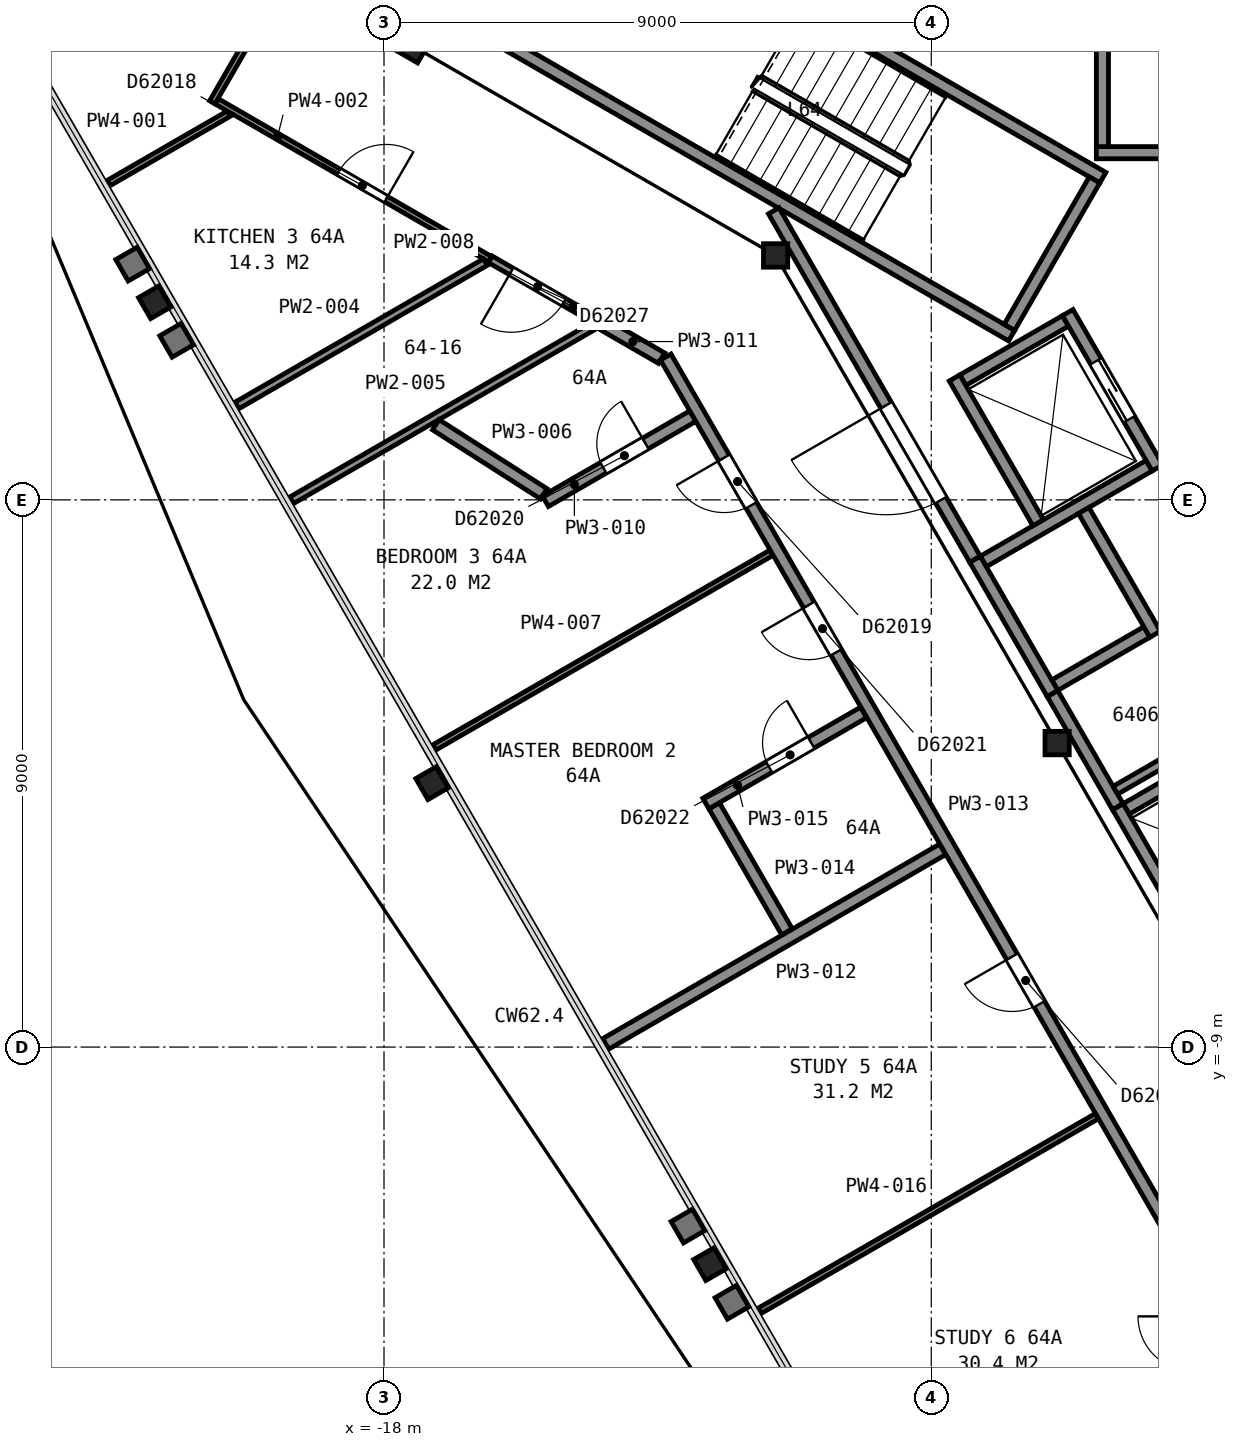
"""IFC4 building model, lengths in metres.
Left out: names, types, materials, properties, quantities, classifications, styles, units other than length and angle.
Written with IfcOpenShell. Run it as: python <this file> out.ifc"""

import sys

from ifc_helpers import new_model, si_unit, direction, frame, frame_2d, origin, origin_2d, place, context, subcontext, project, spatial, rectangle, i_section, extrude, element, fill, save


model = new_model("IFC4")
c1 = context("Model", 3, precision=1e-05, world=origin(), true_north=direction((0.0, 1.0)))
c2 = subcontext(c1, "Body", "Model", "MODEL_VIEW")
j1 = project(units=[si_unit("LENGTHUNIT", "METRE"), si_unit("PLANEANGLEUNIT", "RADIAN")], contexts=[c1])
p1 = place(None, origin())
s1 = spatial("IfcSite", under=j1, at=p1, CompositionType="ELEMENT")
p2 = place(p1, origin())
s2 = spatial("IfcBuilding", under=s1, at=p2, CompositionType="ELEMENT")
p3 = place(p2, frame((0.0, 0.0, 254.5)))
s3 = spatial("IfcBuildingStorey", under=s2, at=p3, CompositionType="ELEMENT", Elevation=254.5)
for number, where, z_axis, x_axis in (
    (1, (-21.77, 3.25, 0.0), (0.0, 0.0, 1.0), (-0.5, 0.866, 0.0)),
    (2, (-17.21, -4.66, 0.0), (0.0, 0.0, 1.0), (-0.5, 0.866, 0.0)),
    (3, (-12.64, -12.57, 0.0), (0.0, 0.0, 1.0), (-0.5, 0.866, 0.0)),
):
    element("IfcColumn", number, at=place(p3, frame(where, z_axis=z_axis, x_axis=x_axis)), inside=s3, PredefinedType="COLUMN", context=c2, shape_type="SweptSolid", body=[
        extrude(i_section(OverallWidth=0.399, OverallDepth=0.386, WebThickness=0.021, FlangeThickness=0.033, FilletRadius=0.015, at=origin_2d()), origin(), (0.0, 0.0, 1.0), 3.01),
    ])
p4 = place(p3, frame((-17.52, 7.46, 0.0), z_axis=(0.0, 0.0, 1.0), x_axis=(0.5, 0.866025403784, 0.0)))
e4 = element("IfcColumn", 4, at=p4, inside=s3, PredefinedType="COLUMN", context=c2, shape_type="SweptSolid", body=[
    extrude(i_section(OverallWidth=0.401, OverallDepth=0.399, WebThickness=0.025, FlangeThickness=0.04, FilletRadius=0.015, at=origin_2d()), origin(), (0.0, 0.0, 1.0), 3.65),
])
p5 = place(p3, frame((-11.56, 4.02, 0.0), z_axis=(0.0, 0.0, 1.0), x_axis=(1.0, 0.0, 0.0)))
e5 = element("IfcColumn", 5, at=p5, inside=s3, PredefinedType="COLUMN", context=c2, shape_type="SweptSolid", body=[
    extrude(i_section(OverallWidth=0.399, OverallDepth=0.386, WebThickness=0.021, FlangeThickness=0.033, FilletRadius=0.015, at=origin_2d()), origin(), (0.0, 0.0, 1.0), 3.635),
])
p6 = place(p3, frame((-6.93, -4.0, 0.0), z_axis=(0.0, 0.0, 1.0), x_axis=(1.0, 0.0, 0.0)))
e6 = element("IfcColumn", 6, at=p6, inside=s3, PredefinedType="COLUMN", context=c2, shape_type="SweptSolid", body=[
    extrude(i_section(OverallWidth=0.399, OverallDepth=0.386, WebThickness=0.021, FlangeThickness=0.033, FilletRadius=0.015, at=origin_2d()), origin(), (0.0, 0.0, 1.0), 3.66),
])
for number, where, z_axis, x_axis in (
    (7, (-7.678, 2.701, 0.0), (0.0, 0.0, 1.0), (-0.866, 0.5, 0.0)),
    (8, (-6.178, 5.299, 0.0), (0.0, 0.0, 1.0), (-0.866, 0.5, 0.0)),
):
    element("IfcWall", number, at=place(p3, frame(where, z_axis=z_axis, x_axis=x_axis)), inside=s3, PredefinedType="PARTITIONING", context=c2, shape_type="SweptSolid", body=[
        extrude(rectangle(XDim=9.6, YDim=0.2, at=frame_2d((4.8, 0.0))), origin(), (0.0, 0.0, 1.0), 3.45),
    ])
p7 = place(p3, frame((-6.315, 5.262, 0.0), z_axis=(0.0, 0.0, 1.0), x_axis=(-0.500049511043, -0.865996816683, 0.0)))
e9 = element("IfcWall", 9, at=p7, inside=s3, PredefinedType="PARTITIONING", context=c2, shape_type="SweptSolid", body=[
    extrude(rectangle(XDim=2.8, YDim=0.2, at=frame_2d((1.4, 0.0))), origin(), (0.0, 0.0, 1.0), 3.45),
])
p8 = place(p3, frame((-6.285, 5.71, 0.0), z_axis=(0.0, 0.0, 1.0), x_axis=(1.0, 0.0, 0.0)))
e10 = element("IfcWall", 10, at=p8, inside=s3, PredefinedType="PARTITIONING", context=c2, shape_type="SweptSolid", body=[
    extrude(rectangle(XDim=2.35, YDim=0.2, at=frame_2d((1.175, 0.0))), origin(), (0.0, 0.0, 1.0), 3.7),
])
for number, where, z_axis, x_axis in (
    (11, (-5.795, -5.083, 0.0), (0.0, 0.0, 1.0), (0.866, 0.5, 0.0)),
    (12, (-6.97, -3.048, 0.0), (0.0, 0.0, 1.0), (0.866, 0.5, 0.0)),
):
    element("IfcWall", number, at=place(p3, frame(where, z_axis=z_axis, x_axis=x_axis)), inside=s3, PredefinedType="PARTITIONING", context=c2, shape_type="SweptSolid", body=[
        extrude(rectangle(XDim=1.75, YDim=0.2, at=frame_2d((0.875, 0.0))), origin(), (0.0, 0.0, 1.0), 3.7),
    ])
p9 = place(p3, frame((-8.145, -1.013, 0.0), z_axis=(0.0, 0.0, 1.0), x_axis=(0.866016494683, 0.500015430699, 0.0)))
e13 = element("IfcWall", 13, at=p9, inside=s3, PredefinedType="PARTITIONING", context=c2, shape_type="SweptSolid", body=[
    extrude(rectangle(XDim=3.15, YDim=0.2, at=frame_2d((1.575, 0.0))), origin(), (0.0, 0.0, 1.0), 3.7),
])
p10 = place(p3, frame((-8.48, 1.969, 0.0), z_axis=(0.0, 0.0, 1.0), x_axis=(0.866000020948, 0.500043961785, 0.0)))
e14 = element("IfcWall", 14, at=p10, inside=s3, PredefinedType="PARTITIONING", context=c2, shape_type="SweptSolid", body=[
    extrude(rectangle(XDim=1.95, YDim=0.2, at=frame_2d((0.975, 0.0))), origin(), (0.0, 0.0, 1.0), 3.7),
])
p11 = place(p3, frame((-6.185, 5.81, 0.0), z_axis=(0.0, 0.0, 1.0), x_axis=(0.0, 1.0, 0.0)))
e15 = element("IfcWall", 15, at=p11, inside=s3, PredefinedType="PARTITIONING", context=c2, shape_type="SweptSolid", body=[
    extrude(rectangle(XDim=1.75, YDim=0.2, at=frame_2d((0.875, 0.0))), origin(), (0.0, 0.0, 1.0), 3.7),
])
p12 = place(p3, frame((-5.28, 0.525, 0.0), z_axis=(0.0, 0.0, 1.0), x_axis=(-0.500037662692, 0.866003658127, 0.0)))
e16 = element("IfcWall", 16, at=p12, inside=s3, PredefinedType="PARTITIONING", context=c2, shape_type="SweptSolid", body=[
    extrude(rectangle(XDim=2.95, YDim=0.2, at=frame_2d((1.475, 0.0))), origin(), (0.0, 0.0, 1.0), 3.7),
])
p13 = place(p12, frame((0.925, 0.0, 0.0)))
e17 = element("IfcOpeningElement", 17, at=p13, cuts=e16, PredefinedType="OPENING", context=c2, shape_type="SweptSolid", body=[
    extrude(rectangle(XDim=1.1, YDim=2.1, at=frame_2d((0.55, 1.05))), frame((0.0, 0.11, 0.0), z_axis=(0.0, -1.0, 0.0), x_axis=(1.0, 0.0, 0.0)), (0.0, 0.0, 1.0), 0.22),
])
p14 = place(p3, frame((-5.318, -2.21, 0.0), z_axis=(0.0, 0.0, 1.0), x_axis=(-0.499938297808, 0.866061024631, 0.0)))
e18 = element("IfcWall", 18, at=p14, inside=s3, PredefinedType="PARTITIONING", context=c2, shape_type="SweptSolid", body=[
    extrude(rectangle(XDim=2.35, YDim=0.2, at=frame_2d((1.175, 0.0))), origin(), (0.0, 0.0, 1.0), 3.7),
])
p15 = place(p3, frame((-7.242, -0.376, 0.0), z_axis=(0.0, 0.0, 1.0), x_axis=(-0.499996545922, 0.866027397988, 0.0)))
e19 = element("IfcWall", 19, at=p15, inside=s3, PredefinedType="PARTITIONING", context=c2, shape_type="SweptSolid", body=[
    extrude(rectangle(XDim=2.75, YDim=0.2, at=frame_2d((1.375, 0.0))), origin(), (0.0, 0.0, 1.0), 3.7),
])
for number, where, z_axis, x_axis in (
    (20, (-4.656, -7.255, 0.0), (0.0, 0.0, 1.0), (-0.5, 0.866, 0.0)),
    (21, (-7.006, -3.185, 0.0), (0.0, 0.0, 1.0), (-0.5, 0.866, 0.0)),
):
    element("IfcWall", number, at=place(p3, frame(where, z_axis=z_axis, x_axis=x_axis)), inside=s3, PredefinedType="PARTITIONING", context=c2, shape_type="SweptSolid", body=[
        extrude(rectangle(XDim=2.55, YDim=0.2, at=frame_2d((1.275, 0.0))), origin(), (0.0, 0.0, 1.0), 3.7),
    ])
p16 = place(p3, frame((-11.591, 4.755, 0.0), z_axis=(0.0, 0.0, 1.0), x_axis=(0.500043977787, -0.866000011708, 0.0)))
e22 = element("IfcWall", 22, at=p16, inside=s3, PredefinedType="PARTITIONING", context=c2, shape_type="SweptSolid", body=[
    extrude(rectangle(XDim=6.617, YDim=0.2, at=frame_2d((3.308, 0.0))), origin(), (0.0, 0.0, 1.0), 3.45),
])
p17 = place(p16, frame((3.695, 0.0, 0.0)))
e23 = element("IfcOpeningElement", 23, at=p17, cuts=e22, PredefinedType="OPENING", context=c2, shape_type="SweptSolid", body=[
    extrude(rectangle(XDim=1.8, YDim=2.1, at=frame_2d((0.9, 1.05))), frame((0.0, 0.11, 0.0), z_axis=(0.0, -1.0, 0.0), x_axis=(1.0, 0.0, 0.0)), (0.0, 0.0, 1.0), 0.22),
])
p18 = place(p3, frame((-7.005, -3.187, 0.0), z_axis=(0.0, 0.0, 1.0), x_axis=(0.499689606989, -0.866204535123, 0.0)))
e24 = element("IfcWall", 24, at=p18, inside=s3, PredefinedType="PARTITIONING", context=c2, shape_type="SweptSolid", body=[
    extrude(rectangle(XDim=2.145, YDim=0.2, at=frame_2d((1.072, 0.0))), origin(), (0.0, 0.0, 1.0), 3.45),
])
p19 = place(p3, frame((-5.972, -4.776, 0.0), z_axis=(0.0, 0.0, 1.0), x_axis=(0.8660731567, 0.4999172804, 0.0)))
e25 = element("IfcWall", 25, at=p19, inside=s3, PredefinedType="PARTITIONING", context=c2, shape_type="SweptSolid", body=[
    extrude(rectangle(XDim=2.676, YDim=0.15, at=frame_2d((1.338, 0.0))), origin(), (0.0, 0.0, 1.0), 3.45),
])
p20 = place(p3, frame((-22.53, 5.21, 0.0), z_axis=(0.0, 0.0, 1.0), x_axis=(0.865865073245, 0.500277597875, 0.0)))
e26 = element("IfcWall", 26, at=p20, inside=s3, PredefinedType="PARTITIONING", context=c2, shape_type="SweptSolid", body=[
    extrude(rectangle(XDim=2.284, YDim=0.1, at=frame_2d((1.142, 0.0))), origin(), (0.0, 0.0, 1.0), 2.362),
])
p21 = place(p3, frame((-16.253, 3.957, 0.0), z_axis=(0.0, 0.0, 1.0), x_axis=(-0.866006514596, 0.500032715607, 0.0)))
e27 = element("IfcWall", 27, at=p21, inside=s3, PredefinedType="PARTITIONING", context=c2, shape_type="SweptSolid", body=[
    extrude(rectangle(XDim=5.199, YDim=0.1, at=frame_2d((2.6, 0.0))), origin(), (0.0, 0.0, 1.0), 2.362),
])
p22 = place(p21, frame((1.978, 0.0, 0.0)))
e28 = element("IfcOpeningElement", 28, at=p22, cuts=e27, PredefinedType="OPENING", context=c2, shape_type="SweptSolid", body=[
    extrude(rectangle(XDim=0.9, YDim=2.1, at=frame_2d((0.45, 1.05))), frame((0.0, 0.06, 0.0), z_axis=(0.0, -1.0, 0.0), x_axis=(1.0, 0.0, 0.0)), (0.0, 0.0, 1.0), 0.12),
])
p23 = place(p3, frame((-20.824, 6.539, 0.0), z_axis=(0.0, 0.0, 1.0), x_axis=(0.500297300687, 0.865853689098, 0.0)))
e29 = element("IfcWall", 29, at=p23, inside=s3, PredefinedType="PARTITIONING", context=c2, shape_type="SweptSolid", body=[
    extrude(rectangle(XDim=9.496, YDim=0.1, at=frame_2d((4.748, 0.0))), origin(), (0.0, 0.0, 1.0), 2.362),
])
p24 = place(p23, frame((4.3, 0.0, 0.0)))
e30 = element("IfcOpeningElement", 30, at=p24, cuts=e29, PredefinedType="OPENING", context=c2, shape_type="SweptSolid", body=[
    extrude(rectangle(XDim=0.9, YDim=2.1, at=frame_2d((0.45, 1.05))), frame((0.0, 0.06, 0.0), z_axis=(0.0, -1.0, 0.0), x_axis=(1.0, 0.0, 0.0)), (0.0, 0.0, 1.0), 0.12),
])
p25 = place(p3, frame((-20.418, 1.553, 0.0), z_axis=(0.0, 0.0, 1.0), x_axis=(0.8660976733, 0.49987480463, 0.0)))
e31 = element("IfcWall", 31, at=p25, inside=s3, PredefinedType="PARTITIONING", context=c2, shape_type="SweptSolid", body=[
    extrude(rectangle(XDim=4.717, YDim=0.125, at=frame_2d((2.358, 0.0))), origin(), (0.0, 0.0, 1.0), 2.362),
])
p26 = place(p3, frame((-19.518, -0.006, 0.0), z_axis=(0.0, 0.0, 1.0), x_axis=(0.866072118736, 0.499919078599, 0.0)))
e32 = element("IfcWall", 32, at=p26, inside=s3, PredefinedType="PARTITIONING", context=c2, shape_type="SweptSolid", body=[
    extrude(rectangle(XDim=5.912, YDim=0.125, at=frame_2d((2.956, 0.0))), origin(), (0.0, 0.0, 1.0), 2.362),
])
p27 = place(p3, frame((-17.149, 1.236, 0.0), z_axis=(0.0, 0.0, 1.0), x_axis=(0.842376529327, -0.538889397593, 0.0)))
e33 = element("IfcWall", 33, at=p27, inside=s3, PredefinedType="PARTITIONING", context=c2, shape_type="SweptSolid", body=[
    extrude(rectangle(XDim=2.108, YDim=0.2, at=frame_2d((1.054, 0.0))), origin(), (0.0, 0.0, 1.0), 2.362),
])
p28 = place(p3, frame((-17.171, -4.071, 0.0), z_axis=(0.0, 0.0, 1.0), x_axis=(0.865973383125, 0.500090091603, 0.0)))
e34 = element("IfcWall", 34, at=p28, inside=s3, PredefinedType="PARTITIONING", context=c2, shape_type="SweptSolid", body=[
    extrude(rectangle(XDim=6.4, YDim=0.1, at=frame_2d((3.2, 0.0))), origin(), (0.0, 0.0, 1.0), 2.362),
])
p29 = place(p3, frame((-16.253, 3.957, 0.0), z_axis=(0.0, 0.0, 1.0), x_axis=(0.866173232673, -0.499743865396, 0.0)))
e35 = element("IfcWall", 35, at=p29, inside=s3, PredefinedType="PARTITIONING", context=c2, shape_type="SweptSolid", body=[
    extrude(rectangle(XDim=1.974, YDim=0.125, at=frame_2d((0.987, 0.0))), origin(), (0.0, 0.0, 1.0), 2.362),
])
p30 = place(p29, frame((0.4, 0.0, 0.0)))
e36 = element("IfcOpeningElement", 36, at=p30, cuts=e35, PredefinedType="OPENING", context=c2, shape_type="SweptSolid", body=[
    extrude(rectangle(XDim=1.0, YDim=2.1, at=frame_2d((0.5, 1.05))), frame((0.0, 0.073, 0.0), z_axis=(0.0, -1.0, 0.0), x_axis=(1.0, 0.0, 0.0)), (0.0, 0.0, 1.0), 0.145),
])
p31 = place(p3, frame((-15.346, -0.023, 0.0), z_axis=(0.0, 0.0, 1.0), x_axis=(0.865969158485, 0.500097407065, 0.0)))
e37 = element("IfcWall", 37, at=p31, inside=s3, PredefinedType="PARTITIONING", context=c2, shape_type="SweptSolid", body=[
    extrude(rectangle(XDim=2.799, YDim=0.2, at=frame_2d((1.4, 0.0))), origin(), (0.0, 0.0, 1.0), 2.362),
])
p32 = place(p31, frame((1.1, 0.0, 0.0)))
e38 = element("IfcOpeningElement", 38, at=p32, cuts=e37, PredefinedType="OPENING", context=c2, shape_type="SweptSolid", body=[
    extrude(rectangle(XDim=0.8, YDim=2.1, at=frame_2d((0.4, 1.05))), frame((0.0, 0.11, 0.0), z_axis=(0.0, -1.0, 0.0), x_axis=(1.0, 0.0, 0.0)), (0.0, 0.0, 1.0), 0.22),
])
p33 = place(p3, frame((-14.381, 2.877, 0.0), z_axis=(0.0, 0.0, 1.0), x_axis=(0.866215333661, -0.499670887416, 0.0)))
e39 = element("IfcWall", 39, at=p33, inside=s3, PredefinedType="PARTITIONING", context=c2, shape_type="SweptSolid", body=[
    extrude(rectangle(XDim=1.093, YDim=0.2, at=frame_2d((0.546, 0.0))), origin(), (0.0, 0.0, 1.0), 2.362),
])
p34 = place(p3, frame((-14.355, -8.948, 0.0), z_axis=(0.0, 0.0, 1.0), x_axis=(0.866039463868, 0.499975646431, 0.0)))
e40 = element("IfcWall", 40, at=p34, inside=s3, PredefinedType="PARTITIONING", context=c2, shape_type="SweptSolid", body=[
    extrude(rectangle(XDim=6.399, YDim=0.2, at=frame_2d((3.2, 0.0))), origin(), (0.0, 0.0, 1.0), 2.362),
])
p35 = place(p3, frame((-4.675, -12.706, 0.0), z_axis=(0.0, 0.0, 1.0), x_axis=(-0.499972470324, 0.866041297467, 0.0)))
e41 = element("IfcWall", 41, at=p35, inside=s3, PredefinedType="PARTITIONING", context=c2, shape_type="SweptSolid", body=[
    extrude(rectangle(XDim=17.385, YDim=0.2, at=frame_2d((8.692, 0.0))), origin(), (0.0, 0.0, 1.0), 2.362),
])
p36 = place(p35, frame((14.57, 0.0, 0.0)))
e42 = element("IfcOpeningElement", 42, at=p36, cuts=e41, PredefinedType="OPENING", context=c2, shape_type="SweptSolid", body=[
    extrude(rectangle(XDim=0.9, YDim=2.1, at=frame_2d((0.45, 1.05))), frame((0.0, 0.11, 0.0), z_axis=(0.0, -1.0, 0.0), x_axis=(1.0, 0.0, 0.0)), (0.0, 0.0, 1.0), 0.22),
])
p37 = place(p35, frame((11.777, 0.0, 0.0)))
e43 = element("IfcOpeningElement", 43, at=p37, cuts=e41, PredefinedType="OPENING", context=c2, shape_type="SweptSolid", body=[
    extrude(rectangle(XDim=0.9, YDim=2.1, at=frame_2d((0.45, 1.05))), frame((0.0, 0.11, 0.0), z_axis=(0.0, -1.0, 0.0), x_axis=(1.0, 0.0, 0.0)), (0.0, 0.0, 1.0), 0.22),
])
p38 = place(p35, frame((5.095, 0.0, 0.0)))
e44 = element("IfcOpeningElement", 44, at=p38, cuts=e41, PredefinedType="OPENING", context=c2, shape_type="SweptSolid", body=[
    extrude(rectangle(XDim=0.9, YDim=2.1, at=frame_2d((0.45, 1.05))), frame((0.0, 0.11, 0.0), z_axis=(0.0, -1.0, 0.0), x_axis=(1.0, 0.0, 0.0)), (0.0, 0.0, 1.0), 0.22),
])
p39 = place(p3, frame((-12.57, -5.031, 0.0), z_axis=(0.0, 0.0, 1.0), x_axis=(0.499943030081, -0.866058292884, 0.0)))
e45 = element("IfcWall", 45, at=p39, inside=s3, PredefinedType="PARTITIONING", context=c2, shape_type="SweptSolid", body=[
    extrude(rectangle(XDim=2.395, YDim=0.2, at=frame_2d((1.198, 0.0))), origin(), (0.0, 0.0, 1.0), 2.362),
])
p40 = place(p3, frame((-10.113, -3.497, 0.0), z_axis=(0.0, 0.0, 1.0), x_axis=(-0.866032178313, -0.499988265988, 0.0)))
e46 = element("IfcWall", 46, at=p40, inside=s3, PredefinedType="PARTITIONING", context=c2, shape_type="SweptSolid", body=[
    extrude(rectangle(XDim=2.995, YDim=0.2, at=frame_2d((1.497, 0.0))), origin(), (0.0, 0.0, 1.0), 2.362),
])
p41 = place(p40, frame((0.995, 0.0, 0.0)))
e47 = element("IfcOpeningElement", 47, at=p41, cuts=e46, PredefinedType="OPENING", context=c2, shape_type="SweptSolid", body=[
    extrude(rectangle(XDim=0.8, YDim=2.1, at=frame_2d((0.4, 1.05))), frame((0.0, 0.11, 0.0), z_axis=(0.0, -1.0, 0.0), x_axis=(1.0, 0.0, 0.0)), (0.0, 0.0, 1.0), 0.22),
])
p42 = place(p3, frame((-11.821, -13.337, 0.0), z_axis=(0.0, 0.0, 1.0), x_axis=(0.866013405822, 0.500020780506, 0.0)))
e48 = element("IfcWall", 48, at=p42, inside=s3, PredefinedType="PARTITIONING", context=c2, shape_type="SweptSolid", body=[
    extrude(rectangle(XDim=6.399, YDim=0.1, at=frame_2d((3.2, 0.0))), origin(), (0.0, 0.0, 1.0), 2.362),
])
p43 = place(p13, origin())
e49 = element("IfcDoor", 49, at=p43, inside=s3, OperationType="SLIDING_TO_LEFT", PredefinedType="DOOR", context=c2, shape_type="SweptSolid", body=[
    extrude(rectangle(XDim=1.1, YDim=2.1, at=frame_2d((0.55, 1.05))), frame((0.0, 0.025, 0.0), z_axis=(0.0, -1.0, 0.0), x_axis=(1.0, 0.0, 0.0)), (0.0, 0.0, 1.0), 0.05),
])
fill(e17, e49)
p44 = place(p17, origin())
e50 = element("IfcDoor", 50, at=p44, inside=s3, OperationType="DOUBLE_DOOR_SINGLE_SWING", PredefinedType="DOOR", context=c2, shape_type="SweptSolid", body=[
    extrude(rectangle(XDim=1.8, YDim=2.1, at=frame_2d((0.9, 1.05))), frame((0.0, 0.025, 0.0), z_axis=(0.0, -1.0, 0.0), x_axis=(1.0, 0.0, 0.0)), (0.0, 0.0, 1.0), 0.05),
])
fill(e23, e50)
p45 = place(p22, origin())
e51 = element("IfcDoor", 51, at=p45, inside=s3, OperationType="SINGLE_SWING_LEFT", PredefinedType="DOOR", context=c2, shape_type="SweptSolid", body=[
    extrude(rectangle(XDim=0.9, YDim=2.1, at=frame_2d((0.45, 1.05))), frame((0.0, 0.025, 0.0), z_axis=(0.0, -1.0, 0.0), x_axis=(1.0, 0.0, 0.0)), (0.0, 0.0, 1.0), 0.05),
])
fill(e28, e51)
p46 = place(p30, origin())
e52 = element("IfcDoor", 52, at=p46, inside=s3, OperationType="SINGLE_SWING_LEFT", PredefinedType="DOOR", context=c2, shape_type="SweptSolid", body=[
    extrude(rectangle(XDim=1.0, YDim=2.1, at=frame_2d((0.5, 1.05))), frame((0.0, 0.025, 0.0), z_axis=(0.0, -1.0, 0.0), x_axis=(1.0, 0.0, 0.0)), (0.0, 0.0, 1.0), 0.05),
])
fill(e36, e52)
p47 = place(p32, origin())
e53 = element("IfcDoor", 53, at=p47, inside=s3, OperationType="SINGLE_SWING_RIGHT", PredefinedType="DOOR", context=c2, shape_type="SweptSolid", body=[
    extrude(rectangle(XDim=0.8, YDim=2.1, at=frame_2d((0.4, 1.05))), frame((0.0, 0.025, 0.0), z_axis=(0.0, -1.0, 0.0), x_axis=(1.0, 0.0, 0.0)), (0.0, 0.0, 1.0), 0.05),
])
fill(e38, e53)
p48 = place(p36, origin())
e54 = element("IfcDoor", 54, at=p48, inside=s3, OperationType="SINGLE_SWING_RIGHT", PredefinedType="DOOR", context=c2, shape_type="SweptSolid", body=[
    extrude(rectangle(XDim=0.9, YDim=2.1, at=frame_2d((0.45, 1.05))), frame((0.0, 0.025, 0.0), z_axis=(0.0, -1.0, 0.0), x_axis=(1.0, 0.0, 0.0)), (0.0, 0.0, 1.0), 0.05),
])
fill(e42, e54)
p49 = place(p37, origin())
e55 = element("IfcDoor", 55, at=p49, inside=s3, OperationType="SINGLE_SWING_RIGHT", PredefinedType="DOOR", context=c2, shape_type="SweptSolid", body=[
    extrude(rectangle(XDim=0.9, YDim=2.1, at=frame_2d((0.45, 1.05))), frame((0.0, 0.025, 0.0), z_axis=(0.0, -1.0, 0.0), x_axis=(1.0, 0.0, 0.0)), (0.0, 0.0, 1.0), 0.05),
])
fill(e43, e55)
p50 = place(p38, origin())
e56 = element("IfcDoor", 56, at=p50, inside=s3, OperationType="SINGLE_SWING_RIGHT", PredefinedType="DOOR", context=c2, shape_type="SweptSolid", body=[
    extrude(rectangle(XDim=0.9, YDim=2.1, at=frame_2d((0.45, 1.05))), frame((0.0, 0.025, 0.0), z_axis=(0.0, -1.0, 0.0), x_axis=(1.0, 0.0, 0.0)), (0.0, 0.0, 1.0), 0.05),
])
fill(e44, e56)
p51 = place(p41, origin())
e57 = element("IfcDoor", 57, at=p51, inside=s3, OperationType="SINGLE_SWING_LEFT", PredefinedType="DOOR", context=c2, shape_type="SweptSolid", body=[
    extrude(rectangle(XDim=0.8, YDim=2.1, at=frame_2d((0.4, 1.05))), frame((0.0, 0.025, 0.0), z_axis=(0.0, -1.0, 0.0), x_axis=(1.0, 0.0, 0.0)), (0.0, 0.0, 1.0), 0.05),
])
fill(e47, e57)
save(model, sys.argv[1])
